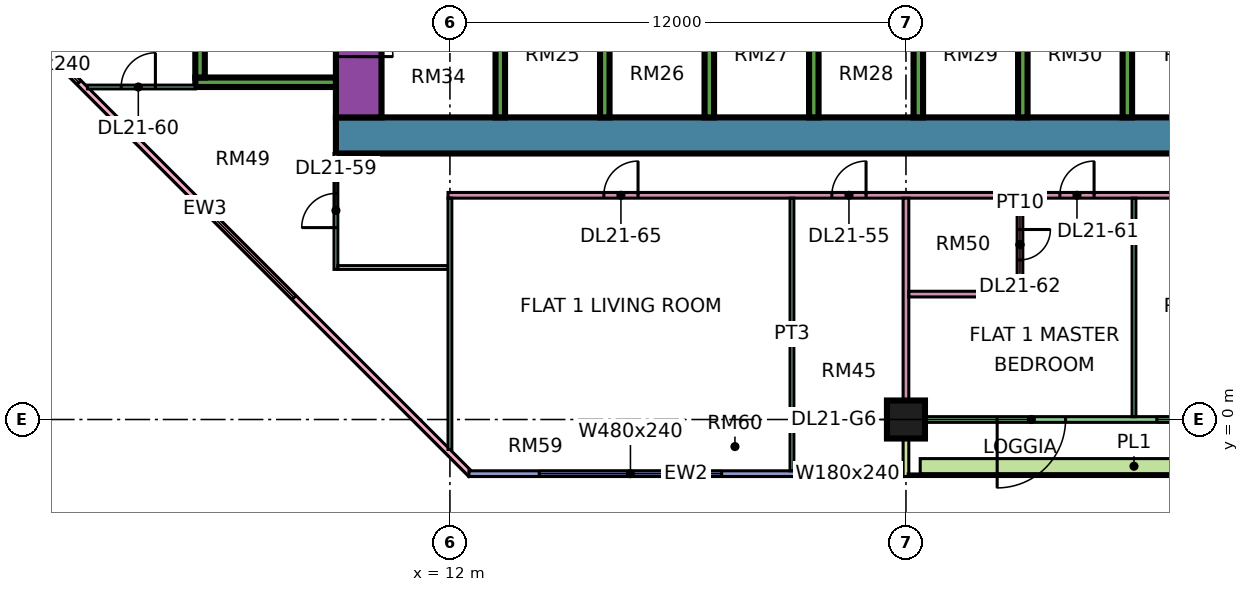
"""IFC4 building model, lengths in metres.
Left out: names, types, materials, properties, quantities, classifications, styles, units other than length and angle.
Written with IfcOpenShell. Run it as: python <this file> out.ifc"""

import sys

from ifc_helpers import new_model, si_unit, direction, frame, frame_2d, origin, origin_2d, place, context, subcontext, project, spatial, rectangle, extrude, element, fill, save


model = new_model("IFC4")
c1 = context("Model", 3, precision=1e-05, world=origin(), true_north=direction((0.0, 1.0)))
c2 = subcontext(c1, "Body", "Model", "MODEL_VIEW")
j1 = project(units=[si_unit("LENGTHUNIT", "METRE"), si_unit("PLANEANGLEUNIT", "RADIAN")], contexts=[c1])
p1 = place(None, origin())
s1 = spatial("IfcSite", under=j1, at=p1, CompositionType="ELEMENT")
p2 = place(p1, origin())
s2 = spatial("IfcBuilding", under=s1, at=p2, CompositionType="ELEMENT")
p3 = place(p2, frame((0.0, 0.0, 95.65)))
s3 = spatial("IfcBuildingStorey", under=s2, at=p3, CompositionType="ELEMENT", Elevation=95.65)
p4 = place(p3, frame((24.0, 0.0, 0.0), z_axis=(0.0, 0.0, 1.0), x_axis=(1.0, 0.0, 0.0)))
e1 = element("IfcColumn", 1, at=p4, inside=s3, PredefinedType="COLUMN", context=c2, shape_type="SweptSolid", body=[
    extrude(rectangle(XDim=1.0, YDim=1.0, at=origin_2d()), origin(), (0.0, 0.0, 1.0), 3.75),
])
p5 = place(p3, frame((9.0, 7.475, 0.0), z_axis=(0.0, 0.0, 1.0), x_axis=(1.0, 0.0, 0.0)))
e2 = element("IfcWall", 2, at=p5, inside=s3, PredefinedType="SHEAR", context=c2, shape_type="SweptSolid", body=[
    extrude(rectangle(XDim=25.0, YDim=0.95, at=frame_2d((12.5, 0.0))), origin(), (0.0, 0.0, 1.0), 3.75),
])
p6 = place(p3, frame((9.6, 7.95, 0.0), z_axis=(0.0, 0.0, 1.0), x_axis=(0.0, 1.0, 0.0)))
e3 = element("IfcWall", 3, at=p6, inside=s3, PredefinedType="SHEAR", context=c2, shape_type="SweptSolid", body=[
    extrude(rectangle(XDim=11.1, YDim=1.2, at=frame_2d((5.55, 0.0))), origin(), (0.0, 0.0, 1.0), 3.75),
])
p7 = place(p6, frame((3.925, 0.0, 0.0)))
e4 = element("IfcOpeningElement", 4, at=p7, cuts=e3, PredefinedType="OPENING", context=c2, shape_type="SweptSolid", body=[
    extrude(rectangle(XDim=1.1, YDim=2.2, at=frame_2d((0.55, 1.1))), frame((0.0, 0.61, 0.0), z_axis=(0.0, -1.0, 0.0), x_axis=(1.0, 0.0, 0.0)), (0.0, 0.0, 1.0), 1.22),
])
p8 = place(p6, frame((6.425, 0.0, 0.0)))
e5 = element("IfcOpeningElement", 5, at=p8, cuts=e3, PredefinedType="OPENING", context=c2, shape_type="SweptSolid", body=[
    extrude(rectangle(XDim=1.1, YDim=2.2, at=frame_2d((0.55, 1.1))), frame((0.0, 0.61, 0.0), z_axis=(0.0, -1.0, 0.0), x_axis=(1.0, 0.0, 0.0)), (0.0, 0.0, 1.0), 1.22),
])
p9 = place(p6, frame((9.175, 0.0, 0.0)))
e6 = element("IfcOpeningElement", 6, at=p9, cuts=e3, PredefinedType="OPENING", context=c2, shape_type="SweptSolid", body=[
    extrude(rectangle(XDim=1.1, YDim=2.2, at=frame_2d((0.55, 1.1))), frame((0.0, 0.61, 0.0), z_axis=(0.0, -1.0, 0.0), x_axis=(1.0, 0.0, 0.0)), (0.0, 0.0, 1.0), 1.22),
])
p10 = place(p6, frame((1.6, 0.0, 0.0)))
e7 = element("IfcOpeningElement", 7, at=p10, cuts=e3, PredefinedType="OPENING", context=c2, shape_type="SweptSolid", body=[
    extrude(rectangle(XDim=0.9, YDim=2.1, at=frame_2d((0.45, 1.05))), frame((0.0, 0.61, 0.0), z_axis=(0.0, -1.0, 0.0), x_axis=(1.0, 0.0, 0.0)), (0.0, 0.0, 1.0), 1.22),
])
p11 = place(p3, frame((13.325, 7.95, 0.0), z_axis=(0.0, 0.0, 1.0), x_axis=(0.0, 1.0, 0.0)))
e8 = element("IfcWall", 8, at=p11, inside=s3, PredefinedType="SHEAR", context=c2, shape_type="SweptSolid", body=[
    extrude(rectangle(XDim=11.1, YDim=0.25, at=frame_2d((5.55, 0.0))), origin(), (0.0, 0.0, 1.0), 3.75),
])
for number, where, z_axis, x_axis in (
    (9, (16.075, 7.95, 0.0), (0.0, 0.0, 1.0), (0.0, 1.0, 0.0)),
    (10, (18.825, 7.95, 0.0), (0.0, 0.0, 1.0), (0.0, 1.0, 0.0)),
    (11, (21.575, 7.95, 0.0), (0.0, 0.0, 1.0), (0.0, 1.0, 0.0)),
    (12, (24.325, 7.95, 0.0), (0.0, 0.0, 1.0), (0.0, 1.0, 0.0)),
    (13, (27.075, 7.95, 0.0), (0.0, 0.0, 1.0), (0.0, 1.0, 0.0)),
    (14, (29.825, 7.95, 0.0), (0.0, 0.0, 1.0), (0.0, 1.0, 0.0)),
):
    element("IfcWall", number, at=place(p3, frame(where, z_axis=z_axis, x_axis=x_axis)), inside=s3, PredefinedType="SHEAR", context=c2, shape_type="SweptSolid", body=[
        extrude(rectangle(XDim=3.25, YDim=0.25, at=frame_2d((1.625, 0.0))), origin(), (0.0, 0.0, 1.0), 3.75),
    ])
p12 = place(p3, frame((5.3, 8.875, 0.0), z_axis=(0.0, 0.0, 1.0), x_axis=(1.0, 0.0, 0.0)))
e15 = element("IfcWall", 15, at=p12, inside=s3, PredefinedType="SHEAR", context=c2, shape_type="SweptSolid", body=[
    extrude(rectangle(XDim=3.7, YDim=0.25, at=frame_2d((1.85, 0.0))), origin(), (0.0, 0.0, 1.0), 3.75),
])
p13 = place(p3, frame((5.425, 9.0, 0.0), z_axis=(0.0, 0.0, 1.0), x_axis=(0.0, 1.0, 0.0)))
e16 = element("IfcWall", 16, at=p13, inside=s3, PredefinedType="SHEAR", context=c2, shape_type="SweptSolid", body=[
    extrude(rectangle(XDim=4.0, YDim=0.25, at=frame_2d((2.0, 0.0))), origin(), (0.0, 0.0, 1.0), 3.75),
])
p14 = place(p3, frame((-1.447, 12.553, 0.0), z_axis=(0.0, 0.0, 1.0), x_axis=(0.707106781187, -0.707106781187, 0.0)))
e17 = element("IfcWall", 17, at=p14, inside=s3, PredefinedType="SOLIDWALL", context=c2, shape_type="SweptSolid", body=[
    extrude(rectangle(XDim=19.799, YDim=0.15, at=frame_2d((9.899, 0.0))), origin(), (0.0, 0.0, 1.0), 3.35),
])
p15 = place(p14, frame((2.212, 0.0, 0.45)))
e18 = element("IfcOpeningElement", 18, at=p15, cuts=e17, PredefinedType="OPENING", context=c2, shape_type="SweptSolid", body=[
    extrude(rectangle(XDim=3.0, YDim=2.4, at=frame_2d((1.5, 1.2))), frame((0.0, 0.085, 0.0), z_axis=(0.0, -1.0, 0.0), x_axis=(1.0, 0.0, 0.0)), (0.0, 0.0, 1.0), 0.17),
])
p16 = place(p14, frame((10.216, 0.0, 0.45)))
e19 = element("IfcOpeningElement", 19, at=p16, cuts=e17, PredefinedType="OPENING", context=c2, shape_type="SweptSolid", body=[
    extrude(rectangle(XDim=3.0, YDim=2.4, at=frame_2d((1.5, 1.2))), frame((0.0, 0.085, 0.0), z_axis=(0.0, -1.0, 0.0), x_axis=(1.0, 0.0, 0.0)), (0.0, 0.0, 1.0), 0.17),
])
p17 = place(p3, frame((12.5, -1.425, 0.0), z_axis=(0.0, 0.0, 1.0), x_axis=(1.0, 0.0, 0.0)))
e20 = element("IfcWall", 20, at=p17, inside=s3, PredefinedType="SOLIDWALL", context=c2, shape_type="SweptSolid", body=[
    extrude(rectangle(XDim=11.425, YDim=0.15, at=frame_2d((5.712, 0.0))), origin(), (0.0, 0.0, 1.0), 3.35),
])
p18 = place(p17, frame((1.85, 0.0, 0.45)))
e21 = element("IfcOpeningElement", 21, at=p18, cuts=e20, PredefinedType="OPENING", context=c2, shape_type="SweptSolid", body=[
    extrude(rectangle(XDim=4.8, YDim=2.4, at=frame_2d((2.4, 1.2))), frame((0.0, 0.085, 0.0), z_axis=(0.0, -1.0, 0.0), x_axis=(1.0, 0.0, 0.0)), (0.0, 0.0, 1.0), 0.17),
])
p19 = place(p17, frame((9.062, 0.0, 0.45)))
e22 = element("IfcOpeningElement", 22, at=p19, cuts=e20, PredefinedType="OPENING", context=c2, shape_type="SweptSolid", body=[
    extrude(rectangle(XDim=1.8, YDim=2.4, at=frame_2d((0.9, 1.2))), frame((0.0, 0.085, 0.0), z_axis=(0.0, -1.0, 0.0), x_axis=(1.0, 0.0, 0.0)), (0.0, 0.0, 1.0), 0.17),
])
p20 = place(p3, frame((24.075, 0.0, 0.0), z_axis=(0.0, 0.0, 1.0), x_axis=(1.0, 0.0, 0.0)))
e23 = element("IfcWall", 23, at=p20, inside=s3, PredefinedType="SOLIDWALL", context=c2, shape_type="SweptSolid", body=[
    extrude(rectangle(XDim=11.85, YDim=0.15, at=frame_2d((5.925, 0.0))), origin(), (0.0, 0.0, 1.0), 3.35),
])
p21 = place(p20, frame((2.325, 0.0, 0.0)))
e24 = element("IfcOpeningElement", 24, at=p21, cuts=e23, PredefinedType="OPENING", context=c2, shape_type="SweptSolid", body=[
    extrude(rectangle(XDim=1.8, YDim=2.4, at=frame_2d((0.9, 1.2))), frame((0.0, 0.085, 0.0), z_axis=(0.0, -1.0, 0.0), x_axis=(1.0, 0.0, 0.0)), (0.0, 0.0, 1.0), 0.17),
])
p22 = place(p20, frame((6.525, 0.0, 0.45)))
e25 = element("IfcOpeningElement", 25, at=p22, cuts=e23, PredefinedType="OPENING", context=c2, shape_type="SweptSolid", body=[
    extrude(rectangle(XDim=1.8, YDim=2.4, at=frame_2d((0.9, 1.2))), frame((0.0, 0.085, 0.0), z_axis=(0.0, -1.0, 0.0), x_axis=(1.0, 0.0, 0.0)), (0.0, 0.0, 1.0), 0.17),
])
p23 = place(p20, frame((9.525, 0.0, 0.45)))
e26 = element("IfcOpeningElement", 26, at=p23, cuts=e23, PredefinedType="OPENING", context=c2, shape_type="SweptSolid", body=[
    extrude(rectangle(XDim=1.2, YDim=2.4, at=frame_2d((0.6, 1.2))), frame((0.0, 0.085, 0.0), z_axis=(0.0, -1.0, 0.0), x_axis=(1.0, 0.0, 0.0)), (0.0, 0.0, 1.0), 0.17),
])
p24 = place(p3, frame((24.0, -1.5, 0.0), z_axis=(0.0, 0.0, 1.0), x_axis=(0.0, 1.0, 0.0)))
e27 = element("IfcWall", 27, at=p24, inside=s3, PredefinedType="SOLIDWALL", context=c2, shape_type="SweptSolid", body=[
    extrude(rectangle(XDim=1.5, YDim=0.15, at=frame_2d((0.75, 0.0))), origin(), (0.0, 0.0, 1.0), 3.35),
])
p25 = place(p3, frame((24.375, -1.229, 0.0), z_axis=(0.0, 0.0, 1.0), x_axis=(1.0, 0.0, 0.0)))
e28 = element("IfcWall", 28, at=p25, inside=s3, PredefinedType="SOLIDWALL", context=c2, shape_type="SweptSolid", body=[
    extrude(rectangle(XDim=11.25, YDim=0.4, at=frame_2d((5.625, 0.0))), origin(), (0.0, 0.0, 1.0), 0.7),
])
p26 = place(p3, frame((2.461, 8.75, 0.0), z_axis=(0.0, 0.0, 1.0), x_axis=(1.0, 0.0, 0.0)))
e29 = element("IfcWall", 29, at=p26, inside=s3, PredefinedType="PARTITIONING", context=c2, shape_type="SweptSolid", body=[
    extrude(rectangle(XDim=2.839, YDim=0.1, at=frame_2d((1.419, 0.0))), origin(), (0.0, 0.0, 1.0), 3.35),
])
p27 = place(p26, frame((0.889, 0.0, 0.0)))
e30 = element("IfcOpeningElement", 30, at=p27, cuts=e29, PredefinedType="OPENING", context=c2, shape_type="SweptSolid", body=[
    extrude(rectangle(XDim=0.9, YDim=2.1, at=frame_2d((0.45, 1.05))), frame((0.0, 0.06, 0.0), z_axis=(0.0, -1.0, 0.0), x_axis=(1.0, 0.0, 0.0)), (0.0, 0.0, 1.0), 0.12),
])
p28 = place(p3, frame((9.0, 3.95, 0.0), z_axis=(0.0, 0.0, 1.0), x_axis=(0.0, 1.0, 0.0)))
e31 = element("IfcWall", 31, at=p28, inside=s3, PredefinedType="PARTITIONING", context=c2, shape_type="SweptSolid", body=[
    extrude(rectangle(XDim=3.05, YDim=0.1, at=frame_2d((1.525, 0.0))), origin(), (0.0, 0.0, 1.0), 3.35),
])
p29 = place(p28, frame((1.1, 0.0, 0.0)))
e32 = element("IfcOpeningElement", 32, at=p29, cuts=e31, PredefinedType="OPENING", context=c2, shape_type="SweptSolid", body=[
    extrude(rectangle(XDim=0.9, YDim=2.1, at=frame_2d((0.45, 1.05))), frame((0.0, 0.06, 0.0), z_axis=(0.0, -1.0, 0.0), x_axis=(1.0, 0.0, 0.0)), (0.0, 0.0, 1.0), 0.12),
])
p30 = place(p3, frame((9.05, 4.0, 0.0), z_axis=(0.0, 0.0, 1.0), x_axis=(1.0, 0.0, 0.0)))
e33 = element("IfcWall", 33, at=p30, inside=s3, PredefinedType="PARTITIONING", context=c2, shape_type="SweptSolid", body=[
    extrude(rectangle(XDim=2.9, YDim=0.1, at=frame_2d((1.45, 0.0))), origin(), (0.0, 0.0, 1.0), 3.35),
])
p31 = place(p3, frame((11.95, 5.9, 0.0), z_axis=(0.0, 0.0, 1.0), x_axis=(1.0, 0.0, 0.0)))
e34 = element("IfcWall", 34, at=p31, inside=s3, PredefinedType="PARTITIONING", context=c2, shape_type="SweptSolid", body=[
    extrude(rectangle(XDim=21.1, YDim=0.15, at=frame_2d((10.55, 0.0))), origin(), (0.0, 0.0, 1.0), 3.35),
])
p32 = place(p31, frame((10.1, 0.0, 0.0)))
e35 = element("IfcOpeningElement", 35, at=p32, cuts=e34, PredefinedType="OPENING", context=c2, shape_type="SweptSolid", body=[
    extrude(rectangle(XDim=0.9, YDim=2.1, at=frame_2d((0.45, 1.05))), frame((0.0, 0.085, 0.0), z_axis=(0.0, -1.0, 0.0), x_axis=(1.0, 0.0, 0.0)), (0.0, 0.0, 1.0), 0.17),
])
p33 = place(p31, frame((16.1, 0.0, 0.0)))
e36 = element("IfcOpeningElement", 36, at=p33, cuts=e34, PredefinedType="OPENING", context=c2, shape_type="SweptSolid", body=[
    extrude(rectangle(XDim=0.9, YDim=2.1, at=frame_2d((0.45, 1.05))), frame((0.0, 0.085, 0.0), z_axis=(0.0, -1.0, 0.0), x_axis=(1.0, 0.0, 0.0)), (0.0, 0.0, 1.0), 0.17),
])
p34 = place(p31, frame((4.1, 0.0, 0.0)))
e37 = element("IfcOpeningElement", 37, at=p34, cuts=e34, PredefinedType="OPENING", context=c2, shape_type="SweptSolid", body=[
    extrude(rectangle(XDim=0.9, YDim=2.1, at=frame_2d((0.45, 1.05))), frame((0.0, 0.085, 0.0), z_axis=(0.0, -1.0, 0.0), x_axis=(1.0, 0.0, 0.0)), (0.0, 0.0, 1.0), 0.17),
])
p35 = place(p3, frame((12.0, -0.788, 0.0), z_axis=(0.0, 0.0, 1.0), x_axis=(0.0, 1.0, 0.0)))
e38 = element("IfcWall", 38, at=p35, inside=s3, PredefinedType="PARTITIONING", context=c2, shape_type="SweptSolid", body=[
    extrude(rectangle(XDim=6.613, YDim=0.1, at=frame_2d((3.306, 0.0))), origin(), (0.0, 0.0, 1.0), 3.35),
])
p36 = place(p3, frame((21.0, -1.35, 0.0), z_axis=(0.0, 0.0, 1.0), x_axis=(0.0, 1.0, 0.0)))
e39 = element("IfcWall", 39, at=p36, inside=s3, PredefinedType="PARTITIONING", context=c2, shape_type="SweptSolid", body=[
    extrude(rectangle(XDim=7.175, YDim=0.1, at=frame_2d((3.587, 0.0))), origin(), (0.0, 0.0, 1.0), 3.35),
])
p37 = place(p3, frame((24.0, 0.0, 0.0), z_axis=(0.0, 0.0, 1.0), x_axis=(0.0, 1.0, 0.0)))
e40 = element("IfcWall", 40, at=p37, inside=s3, PredefinedType="PARTITIONING", context=c2, shape_type="SweptSolid", body=[
    extrude(rectangle(XDim=5.825, YDim=0.15, at=frame_2d((2.913, 0.0))), origin(), (0.0, 0.0, 1.0), 3.35),
])
p38 = place(p3, frame((24.075, 3.3, 0.0), z_axis=(0.0, 0.0, 1.0), x_axis=(1.0, 0.0, 0.0)))
e41 = element("IfcWall", 41, at=p38, inside=s3, PredefinedType="PARTITIONING", context=c2, shape_type="SweptSolid", body=[
    extrude(rectangle(XDim=3.0, YDim=0.15, at=frame_2d((1.5, 0.0))), origin(), (0.0, 0.0, 1.0), 3.35),
])
p39 = place(p3, frame((27.0, 3.375, 0.0), z_axis=(0.0, 0.0, 1.0), x_axis=(0.0, 1.0, 0.0)))
e42 = element("IfcWall", 42, at=p39, inside=s3, PredefinedType="PARTITIONING", context=c2, shape_type="SweptSolid", body=[
    extrude(rectangle(XDim=2.45, YDim=0.15, at=frame_2d((1.225, 0.0))), origin(), (0.0, 0.0, 1.0), 3.35),
])
p40 = place(p39, frame((0.825, 0.0, 0.0)))
e43 = element("IfcOpeningElement", 43, at=p40, cuts=e42, PredefinedType="OPENING", context=c2, shape_type="SweptSolid", body=[
    extrude(rectangle(XDim=0.8, YDim=2.1, at=frame_2d((0.4, 1.05))), frame((0.0, 0.085, 0.0), z_axis=(0.0, -1.0, 0.0), x_axis=(1.0, 0.0, 0.0)), (0.0, 0.0, 1.0), 0.17),
])
p41 = place(p3, frame((30.0, 0.074, 0.0), z_axis=(0.0, 0.0, 1.0), x_axis=(0.0, 1.0, 0.0)))
e44 = element("IfcWall", 44, at=p41, inside=s3, PredefinedType="PARTITIONING", context=c2, shape_type="SweptSolid", body=[
    extrude(rectangle(XDim=5.751, YDim=0.1, at=frame_2d((2.875, 0.0))), origin(), (0.0, 0.0, 1.0), 3.35),
])
p42 = place(p15, origin())
e45 = element("IfcWindow", 45, at=p42, inside=s3, PartitioningType="SINGLE_PANEL", PredefinedType="WINDOW", context=c2, shape_type="SweptSolid", body=[
    extrude(rectangle(XDim=3.0, YDim=2.4, at=frame_2d((1.5, 1.2))), frame((0.0, 0.03, 0.0), z_axis=(0.0, -1.0, 0.0), x_axis=(1.0, 0.0, 0.0)), (0.0, 0.0, 1.0), 0.06),
])
fill(e18, e45)
p43 = place(p16, origin())
e46 = element("IfcWindow", 46, at=p43, inside=s3, PartitioningType="SINGLE_PANEL", PredefinedType="WINDOW", context=c2, shape_type="SweptSolid", body=[
    extrude(rectangle(XDim=3.0, YDim=2.4, at=frame_2d((1.5, 1.2))), frame((0.0, 0.03, 0.0), z_axis=(0.0, -1.0, 0.0), x_axis=(1.0, 0.0, 0.0)), (0.0, 0.0, 1.0), 0.06),
])
fill(e19, e46)
p44 = place(p18, origin())
e47 = element("IfcWindow", 47, at=p44, inside=s3, PartitioningType="SINGLE_PANEL", PredefinedType="WINDOW", context=c2, shape_type="SweptSolid", body=[
    extrude(rectangle(XDim=4.8, YDim=2.4, at=frame_2d((2.4, 1.2))), frame((0.0, 0.03, 0.0), z_axis=(0.0, -1.0, 0.0), x_axis=(1.0, 0.0, 0.0)), (0.0, 0.0, 1.0), 0.06),
])
fill(e21, e47)
p45 = place(p19, origin())
e48 = element("IfcWindow", 48, at=p45, inside=s3, PartitioningType="SINGLE_PANEL", PredefinedType="WINDOW", context=c2, shape_type="SweptSolid", body=[
    extrude(rectangle(XDim=1.8, YDim=2.4, at=frame_2d((0.9, 1.2))), frame((0.0, 0.03, 0.0), z_axis=(0.0, -1.0, 0.0), x_axis=(1.0, 0.0, 0.0)), (0.0, 0.0, 1.0), 0.06),
])
fill(e22, e48)
p46 = place(p21, frame((1.8, 0.0, 0.0), z_axis=(0.0, 0.0, 1.0), x_axis=(-1.0, 0.0, 0.0)))
e49 = element("IfcDoor", 49, at=p46, inside=s3, OperationType="DOUBLE_DOOR_SINGLE_SWING", PredefinedType="DOOR", context=c2, shape_type="SweptSolid", body=[
    extrude(rectangle(XDim=1.8, YDim=2.4, at=frame_2d((0.9, 1.2))), frame((0.0, 0.025, 0.0), z_axis=(0.0, -1.0, 0.0), x_axis=(1.0, 0.0, 0.0)), (0.0, 0.0, 1.0), 0.05),
])
fill(e24, e49)
p47 = place(p22, origin())
e50 = element("IfcWindow", 50, at=p47, inside=s3, PartitioningType="SINGLE_PANEL", PredefinedType="WINDOW", context=c2, shape_type="SweptSolid", body=[
    extrude(rectangle(XDim=1.8, YDim=2.4, at=frame_2d((0.9, 1.2))), frame((0.0, 0.03, 0.0), z_axis=(0.0, -1.0, 0.0), x_axis=(1.0, 0.0, 0.0)), (0.0, 0.0, 1.0), 0.06),
])
fill(e25, e50)
p48 = place(p10, frame((0.9, 0.0, 0.0), z_axis=(0.0, 0.0, 1.0), x_axis=(-1.0, 0.0, 0.0)))
e51 = element("IfcDoor", 51, at=p48, inside=s3, OperationType="SINGLE_SWING_LEFT", PredefinedType="DOOR", context=c2, shape_type="SweptSolid", body=[
    extrude(rectangle(XDim=0.9, YDim=2.1, at=frame_2d((0.45, 1.05))), frame((0.0, 0.025, 0.0), z_axis=(0.0, -1.0, 0.0), x_axis=(1.0, 0.0, 0.0)), (0.0, 0.0, 1.0), 0.05),
])
fill(e7, e51)
p49 = place(p32, frame((0.9, 0.0, 0.0), z_axis=(0.0, 0.0, 1.0), x_axis=(-1.0, 0.0, 0.0)))
e52 = element("IfcDoor", 52, at=p49, inside=s3, OperationType="SINGLE_SWING_RIGHT", PredefinedType="DOOR", context=c2, shape_type="SweptSolid", body=[
    extrude(rectangle(XDim=0.9, YDim=2.1, at=frame_2d((0.45, 1.05))), frame((0.0, 0.025, 0.0), z_axis=(0.0, -1.0, 0.0), x_axis=(1.0, 0.0, 0.0)), (0.0, 0.0, 1.0), 0.05),
])
fill(e35, e52)
p50 = place(p29, origin())
e53 = element("IfcDoor", 53, at=p50, inside=s3, OperationType="SINGLE_SWING_LEFT", PredefinedType="DOOR", context=c2, shape_type="SweptSolid", body=[
    extrude(rectangle(XDim=0.9, YDim=2.1, at=frame_2d((0.45, 1.05))), frame((0.0, 0.025, 0.0), z_axis=(0.0, -1.0, 0.0), x_axis=(1.0, 0.0, 0.0)), (0.0, 0.0, 1.0), 0.05),
])
fill(e32, e53)
p51 = place(p27, frame((0.9, 0.0, 0.0), z_axis=(0.0, 0.0, 1.0), x_axis=(-1.0, 0.0, 0.0)))
e54 = element("IfcDoor", 54, at=p51, inside=s3, OperationType="SINGLE_SWING_RIGHT", PredefinedType="DOOR", context=c2, shape_type="SweptSolid", body=[
    extrude(rectangle(XDim=0.9, YDim=2.1, at=frame_2d((0.45, 1.05))), frame((0.0, 0.025, 0.0), z_axis=(0.0, -1.0, 0.0), x_axis=(1.0, 0.0, 0.0)), (0.0, 0.0, 1.0), 0.05),
])
fill(e30, e54)
p52 = place(p33, frame((0.9, 0.0, 0.0), z_axis=(0.0, 0.0, 1.0), x_axis=(-1.0, 0.0, 0.0)))
e55 = element("IfcDoor", 55, at=p52, inside=s3, OperationType="SINGLE_SWING_RIGHT", PredefinedType="DOOR", context=c2, shape_type="SweptSolid", body=[
    extrude(rectangle(XDim=0.9, YDim=2.1, at=frame_2d((0.45, 1.05))), frame((0.0, 0.025, 0.0), z_axis=(0.0, -1.0, 0.0), x_axis=(1.0, 0.0, 0.0)), (0.0, 0.0, 1.0), 0.05),
])
fill(e36, e55)
p53 = place(p40, origin())
e56 = element("IfcDoor", 56, at=p53, inside=s3, OperationType="SINGLE_SWING_RIGHT", PredefinedType="DOOR", context=c2, shape_type="SweptSolid", body=[
    extrude(rectangle(XDim=0.8, YDim=2.1, at=frame_2d((0.4, 1.05))), frame((0.0, 0.025, 0.0), z_axis=(0.0, -1.0, 0.0), x_axis=(1.0, 0.0, 0.0)), (0.0, 0.0, 1.0), 0.05),
])
fill(e43, e56)
p54 = place(p34, frame((0.9, 0.0, 0.0), z_axis=(0.0, 0.0, 1.0), x_axis=(-1.0, 0.0, 0.0)))
e57 = element("IfcDoor", 57, at=p54, inside=s3, OperationType="SINGLE_SWING_RIGHT", PredefinedType="DOOR", context=c2, shape_type="SweptSolid", body=[
    extrude(rectangle(XDim=0.9, YDim=2.1, at=frame_2d((0.45, 1.05))), frame((0.0, 0.025, 0.0), z_axis=(0.0, -1.0, 0.0), x_axis=(1.0, 0.0, 0.0)), (0.0, 0.0, 1.0), 0.05),
])
fill(e37, e57)
save(model, sys.argv[1])
